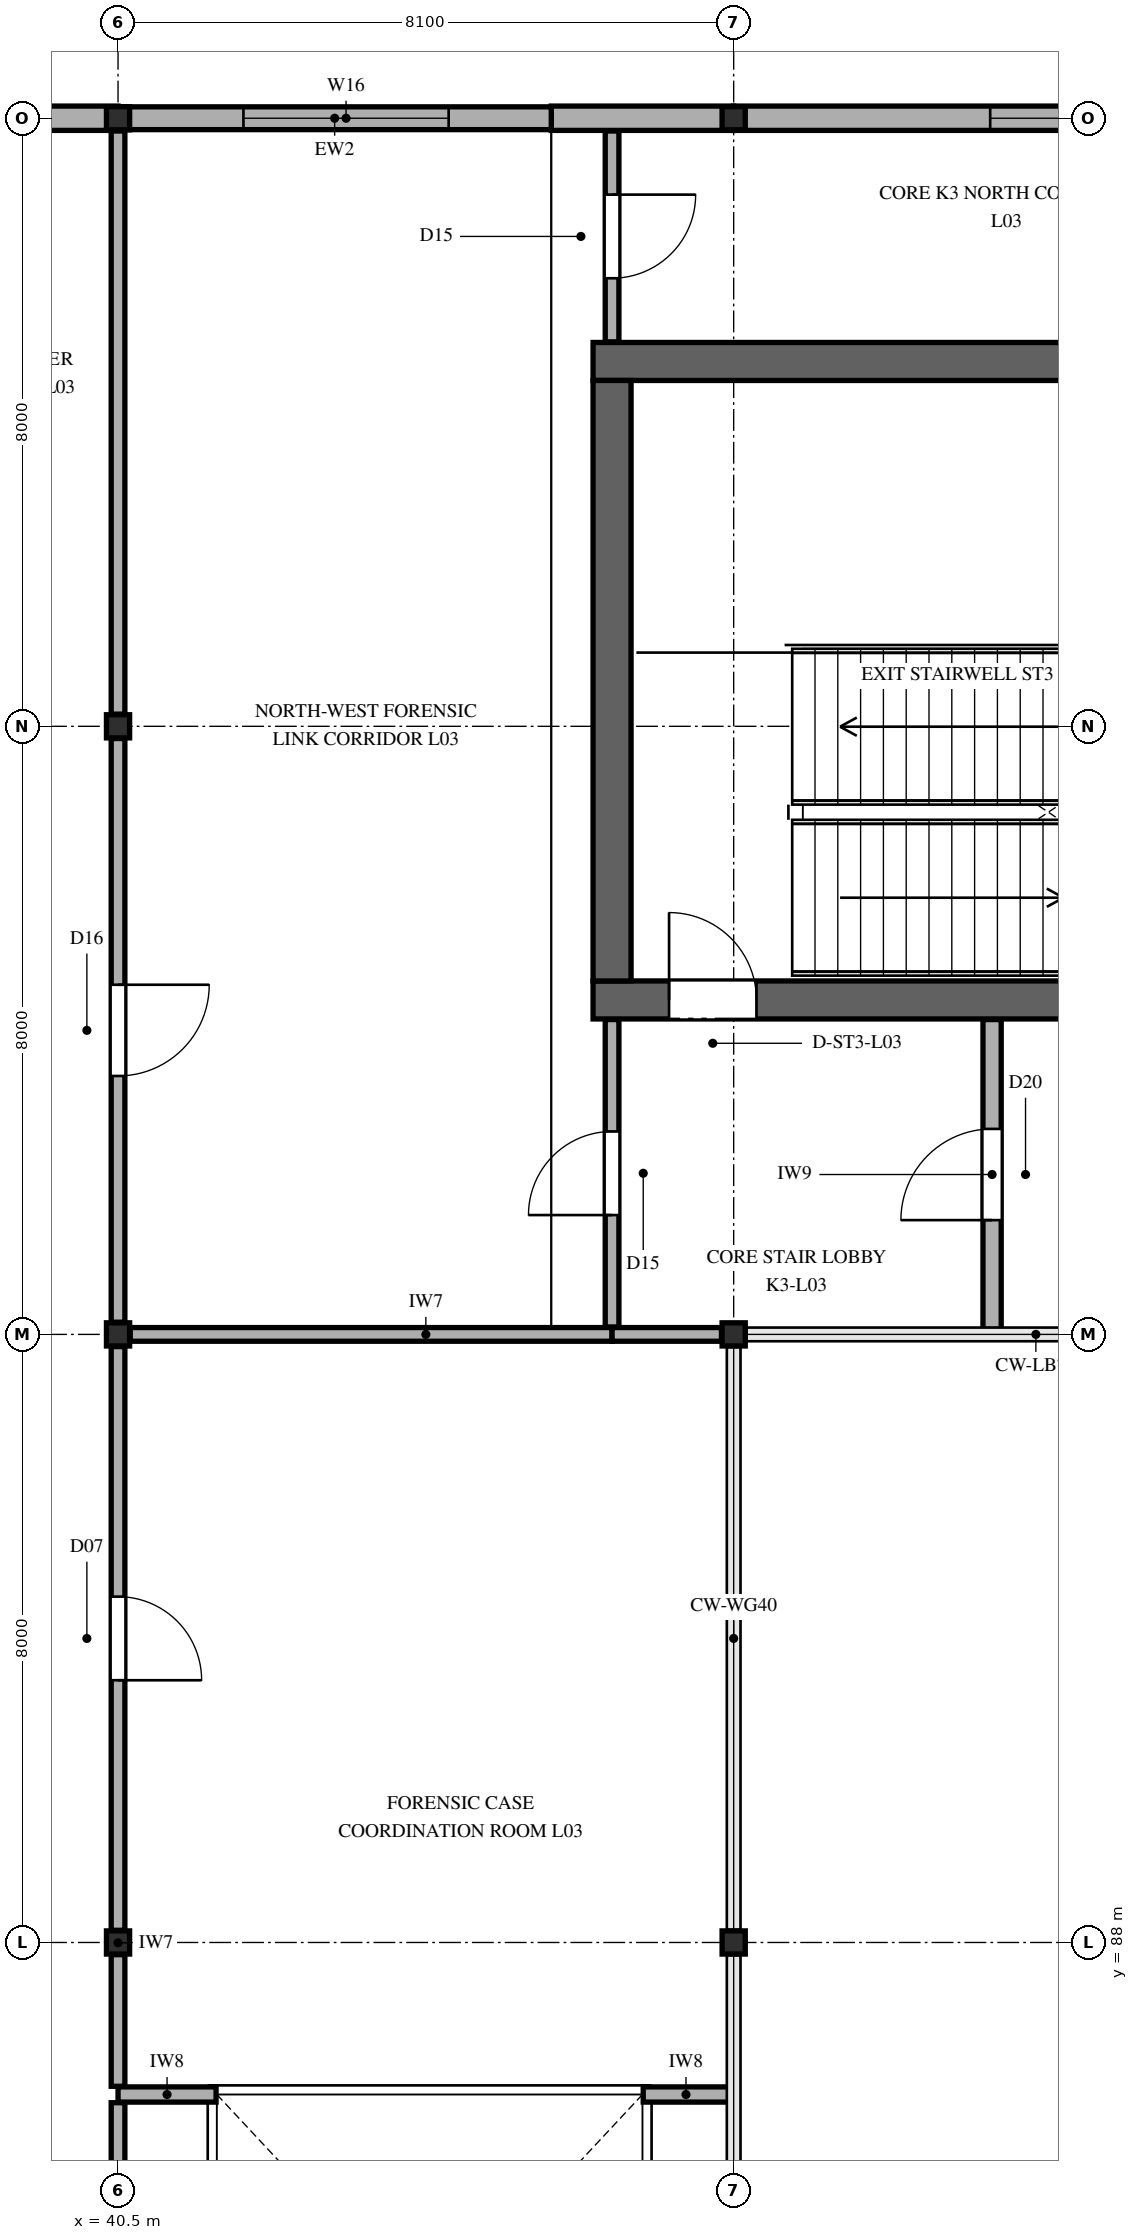
"""IFC4 building model, lengths in metres.
Left out: names, types, materials, properties, quantities, classifications, styles, units other than length and angle.
Written with IfcOpenShell. Run it as: python <this file> out.ifc"""

import sys

from ifc_helpers import new_model, si_unit, direction, frame, frame_2d, origin, origin_2d, place, context, subcontext, project, spatial, rectangle, hollow_rectangle, extrude, element, fill, save


model = new_model("IFC4")
c1 = context("Model", 3, precision=1e-05, world=origin(), true_north=direction((0.0, 1.0)))
c2 = subcontext(c1, "Body", "Model", "MODEL_VIEW")
j1 = project(units=[si_unit("LENGTHUNIT", "METRE"), si_unit("PLANEANGLEUNIT", "RADIAN")], contexts=[c1])
p1 = place(None, origin())
s1 = spatial("IfcSite", under=j1, at=p1, CompositionType="ELEMENT")
p2 = place(p1, origin())
s2 = spatial("IfcBuilding", under=s1, at=p2, CompositionType="ELEMENT")
p3 = place(p2, frame((0.0, 0.0, 14.7)))
s3 = spatial("IfcBuildingStorey", under=s2, at=p3, CompositionType="ELEMENT", Elevation=14.7)
p4 = place(p3, frame((46.75, 100.4, 0.0), z_axis=(0.0, 0.0, 1.0), x_axis=(1.0, 0.0, 0.0)))
e1 = element("IfcWall", 1, at=p4, inside=s3, PredefinedType="SHEAR", context=c2, shape_type="SweptSolid", body=[
    extrude(rectangle(XDim=15.3, YDim=0.5, at=frame_2d((7.65, 0.0))), origin(), (0.0, 0.0, 1.0), 5.1),
])
p5 = place(p4, frame((1.0, 0.0, 0.0)))
e2 = element("IfcOpeningElement", 2, at=p5, cuts=e1, PredefinedType="OPENING", context=c2, shape_type="SweptSolid", body=[
    extrude(rectangle(XDim=1.15, YDim=2.25, at=frame_2d((0.575, 1.125))), frame((0.0, 0.26, 0.0), z_axis=(0.0, -1.0, 0.0), x_axis=(1.0, 0.0, 0.0)), (0.0, 0.0, 1.0), 0.52),
])
p6 = place(p4, frame((10.282, 0.0, 0.0)))
e3 = element("IfcOpeningElement", 3, at=p6, cuts=e1, PredefinedType="OPENING", context=c2, shape_type="SweptSolid", body=[
    extrude(rectangle(XDim=1.1, YDim=2.2, at=frame_2d((0.55, 1.1))), frame((0.0, 0.26, 0.0), z_axis=(0.0, -1.0, 0.0), x_axis=(1.0, 0.0, 0.0)), (0.0, 0.0, 1.0), 0.52),
])
p7 = place(p4, frame((12.998, 0.0, 0.0)))
e4 = element("IfcOpeningElement", 4, at=p7, cuts=e1, PredefinedType="OPENING", context=c2, shape_type="SweptSolid", body=[
    extrude(rectangle(XDim=1.1, YDim=2.2, at=frame_2d((0.55, 1.1))), frame((0.0, 0.26, 0.0), z_axis=(0.0, -1.0, 0.0), x_axis=(1.0, 0.0, 0.0)), (0.0, 0.0, 1.0), 0.52),
])
p8 = place(p3, frame((46.75, 108.8, 0.0), z_axis=(0.0, 0.0, 1.0), x_axis=(1.0, 0.0, 0.0)))
e5 = element("IfcWall", 5, at=p8, inside=s3, PredefinedType="SHEAR", context=c2, shape_type="SweptSolid", body=[
    extrude(rectangle(XDim=15.3, YDim=0.5, at=frame_2d((7.65, 0.0))), origin(), (0.0, 0.0, 1.0), 5.1),
])
p9 = place(p3, frame((47.0, 100.65, 0.0), z_axis=(0.0, 0.0, 1.0), x_axis=(0.0, 1.0, 0.0)))
e6 = element("IfcWall", 6, at=p9, inside=s3, PredefinedType="SHEAR", context=c2, shape_type="SweptSolid", body=[
    extrude(rectangle(XDim=7.9, YDim=0.5, at=frame_2d((3.95, 0.0))), origin(), (0.0, 0.0, 1.0), 5.1),
])
for number, where, z_axis, x_axis in (
    (7, (40.5, 88.0, 0.0), (0.0, 0.0, 1.0), (1.0, 0.0, 0.0)),
    (8, (40.5, 96.0, 0.0), (0.0, 0.0, 1.0), (1.0, 0.0, 0.0)),
    (9, (40.5, 104.0, 0.0), (0.0, 0.0, 1.0), (1.0, 0.0, 0.0)),
    (10, (40.5, 112.0, 0.0), (0.0, 0.0, 1.0), (1.0, 0.0, 0.0)),
):
    element("IfcColumn", number, at=place(p3, frame(where, z_axis=z_axis, x_axis=x_axis)), inside=s3, PredefinedType="COLUMN", context=c2, shape_type="SweptSolid", body=[
        extrude(hollow_rectangle(XDim=0.305, YDim=0.305, WallThickness=0.016, InnerFilletRadius=0.016, OuterFilletRadius=0.032, at=origin_2d()), origin(), (0.0, 0.0, 1.0), 5.1),
    ])
p10 = place(p3, frame((48.6, 88.0, 0.0), z_axis=(0.0, 0.0, 1.0), x_axis=(1.0, 0.0, 0.0)))
e11 = element("IfcColumn", 11, at=p10, inside=s3, PredefinedType="COLUMN", context=c2, shape_type="SweptSolid", body=[
    extrude(hollow_rectangle(XDim=0.305, YDim=0.305, WallThickness=0.016, InnerFilletRadius=0.016, OuterFilletRadius=0.032, at=origin_2d()), origin(), (0.0, 0.0, 1.0), 4.84),
])
for number, where, z_axis, x_axis in (
    (12, (48.6, 96.0, 0.0), (0.0, 0.0, 1.0), (1.0, 0.0, 0.0)),
    (13, (48.6, 112.0, 0.0), (0.0, 0.0, 1.0), (1.0, 0.0, 0.0)),
):
    element("IfcColumn", number, at=place(p3, frame(where, z_axis=z_axis, x_axis=x_axis)), inside=s3, PredefinedType="COLUMN", context=c2, shape_type="SweptSolid", body=[
        extrude(hollow_rectangle(XDim=0.305, YDim=0.305, WallThickness=0.016, InnerFilletRadius=0.016, OuterFilletRadius=0.032, at=origin_2d()), origin(), (0.0, 0.0, 1.0), 5.1),
    ])
p11 = place(p3, frame((62.775, 112.0, 0.0), z_axis=(0.0, 0.0, 1.0), x_axis=(-1.0, 0.0, 0.0)))
e14 = element("IfcWall", 14, at=p11, inside=s3, PredefinedType="SOLIDWALL", context=c2, shape_type="SweptSolid", body=[
    extrude(rectangle(XDim=14.175, YDim=0.32, at=frame_2d((7.087, 0.0))), origin(), (0.0, 0.0, 1.0), 4.232),
])
p12 = place(p11, frame((8.1, 0.0, 0.95)))
e15 = element("IfcOpeningElement", 15, at=p12, cuts=e14, PredefinedType="OPENING", context=c2, shape_type="SweptSolid", body=[
    extrude(rectangle(XDim=2.7, YDim=1.8, at=frame_2d((1.35, 0.9))), frame((0.0, 0.17, 0.0), z_axis=(0.0, -1.0, 0.0), x_axis=(1.0, 0.0, 0.0)), (0.0, 0.0, 1.0), 0.34),
])
p13 = place(p3, frame((48.6, 112.0, 0.0), z_axis=(0.0, 0.0, 1.0), x_axis=(-1.0, 0.0, 0.0)))
e16 = element("IfcWall", 16, at=p13, inside=s3, PredefinedType="SOLIDWALL", context=c2, shape_type="SweptSolid", body=[
    extrude(rectangle(XDim=2.4, YDim=0.32, at=frame_2d((1.2, 0.0))), origin(), (0.0, 0.0, 1.0), 4.232),
])
p14 = place(p3, frame((46.2, 112.0, 0.0), z_axis=(0.0, 0.0, 1.0), x_axis=(-1.0, 0.0, 0.0)))
e17 = element("IfcWall", 17, at=p14, inside=s3, PredefinedType="SOLIDWALL", context=c2, shape_type="SweptSolid", body=[
    extrude(rectangle(XDim=5.7, YDim=0.3, at=frame_2d((2.85, 0.0))), origin(), (0.0, 0.0, 1.0), 4.232),
])
p15 = place(p14, frame((1.35, 0.0, 0.85)))
e18 = element("IfcOpeningElement", 18, at=p15, cuts=e17, PredefinedType="OPENING", context=c2, shape_type="SweptSolid", body=[
    extrude(rectangle(XDim=2.7, YDim=2.1, at=frame_2d((1.35, 1.05))), frame((0.0, 0.16, 0.0), z_axis=(0.0, -1.0, 0.0), x_axis=(1.0, 0.0, 0.0)), (0.0, 0.0, 1.0), 0.32),
])
p16 = place(p3, frame((40.5, 112.0, 0.0), z_axis=(0.0, 0.0, 1.0), x_axis=(-1.0, 0.0, 0.0)))
e19 = element("IfcWall", 19, at=p16, inside=s3, PredefinedType="SOLIDWALL", context=c2, shape_type="SweptSolid", body=[
    extrude(rectangle(XDim=12.15, YDim=0.32, at=frame_2d((6.075, 0.0))), origin(), (0.0, 0.0, 1.0), 4.232),
])
p17 = place(p3, frame((40.5, 86.0, 0.0), z_axis=(0.0, 0.0, 1.0), x_axis=(1.0, 0.0, 0.0)))
e20 = element("IfcWall", 20, at=p17, inside=s3, PredefinedType="PARTITIONING", context=c2, shape_type="SweptSolid", body=[
    extrude(rectangle(XDim=1.29, YDim=0.2, at=frame_2d((0.645, 0.0))), origin(), (0.0, 0.0, 1.0), 4.84),
])
p18 = place(p3, frame((47.41, 86.0, 0.0), z_axis=(0.0, 0.0, 1.0), x_axis=(1.0, 0.0, 0.0)))
e21 = element("IfcWall", 21, at=p18, inside=s3, PredefinedType="PARTITIONING", context=c2, shape_type="SweptSolid", body=[
    extrude(rectangle(XDim=1.125, YDim=0.2, at=frame_2d((0.562, 0.0))), origin(), (0.0, 0.0, 1.0), 4.84),
])
p19 = place(p3, frame((40.66, 96.0, 0.0), z_axis=(0.0, 0.0, 1.0), x_axis=(1.0, 0.0, 0.0)))
e22 = element("IfcWall", 22, at=p19, inside=s3, PredefinedType="PARTITIONING", context=c2, shape_type="SweptSolid", body=[
    extrude(rectangle(XDim=6.34, YDim=0.18, at=frame_2d((3.17, 0.0))), origin(), (0.0, 0.0, 1.0), 4.299),
])
p20 = place(p3, frame((47.0, 96.0, 0.0), z_axis=(0.0, 0.0, 1.0), x_axis=(1.0, 0.0, 0.0)))
e23 = element("IfcWall", 23, at=p20, inside=s3, PredefinedType="PARTITIONING", context=c2, shape_type="SweptSolid", body=[
    extrude(rectangle(XDim=1.44, YDim=0.18, at=frame_2d((0.72, 0.0))), origin(), (0.0, 0.0, 1.0), 4.299),
])
p21 = place(p3, frame((40.5, 80.16, 0.0), z_axis=(0.0, 0.0, 1.0), x_axis=(0.0, 1.0, 0.0)))
e24 = element("IfcWall", 24, at=p21, inside=s3, PredefinedType="PARTITIONING", context=c2, shape_type="SweptSolid", body=[
    extrude(rectangle(XDim=5.732, YDim=0.18, at=frame_2d((2.866, 0.0))), origin(), (0.0, 0.0, 1.0), 4.369),
])
p22 = place(p3, frame((40.5, 86.108, 0.0), z_axis=(0.0, 0.0, 1.0), x_axis=(0.0, 1.0, 0.0)))
e25 = element("IfcWall", 25, at=p22, inside=s3, PredefinedType="PARTITIONING", context=c2, shape_type="SweptSolid", body=[
    extrude(rectangle(XDim=1.732, YDim=0.18, at=frame_2d((0.866, 0.0))), origin(), (0.0, 0.0, 1.0), 4.369),
])
p23 = place(p3, frame((40.5, 88.16, 0.0), z_axis=(0.0, 0.0, 1.0), x_axis=(0.0, 1.0, 0.0)))
e26 = element("IfcWall", 26, at=p23, inside=s3, PredefinedType="PARTITIONING", context=c2, shape_type="SweptSolid", body=[
    extrude(rectangle(XDim=7.679, YDim=0.18, at=frame_2d((3.84, 0.0))), origin(), (0.0, 0.0, 1.0), 4.369),
])
p24 = place(p23, frame((3.29, 0.0, 0.0)))
e27 = element("IfcOpeningElement", 27, at=p24, cuts=e26, PredefinedType="OPENING", context=c2, shape_type="SweptSolid", body=[
    extrude(rectangle(XDim=1.1, YDim=2.2, at=frame_2d((0.55, 1.1))), frame((0.0, 0.1, 0.0), z_axis=(0.0, -1.0, 0.0), x_axis=(1.0, 0.0, 0.0)), (0.0, 0.0, 1.0), 0.2),
])
p25 = place(p3, frame((40.5, 96.16, 0.0), z_axis=(0.0, 0.0, 1.0), x_axis=(0.0, 1.0, 0.0)))
e28 = element("IfcWall", 28, at=p25, inside=s3, PredefinedType="PARTITIONING", context=c2, shape_type="SweptSolid", body=[
    extrude(rectangle(XDim=7.679, YDim=0.18, at=frame_2d((3.84, 0.0))), origin(), (0.0, 0.0, 1.0), 4.332),
])
p26 = place(p25, frame((3.24, 0.0, 0.0)))
e29 = element("IfcOpeningElement", 29, at=p26, cuts=e28, PredefinedType="OPENING", context=c2, shape_type="SweptSolid", body=[
    extrude(rectangle(XDim=1.2, YDim=2.2, at=frame_2d((0.6, 1.1))), frame((0.0, 0.1, 0.0), z_axis=(0.0, -1.0, 0.0), x_axis=(1.0, 0.0, 0.0)), (0.0, 0.0, 1.0), 0.2),
])
p27 = place(p3, frame((40.5, 104.16, 0.0), z_axis=(0.0, 0.0, 1.0), x_axis=(0.0, 1.0, 0.0)))
e30 = element("IfcWall", 30, at=p27, inside=s3, PredefinedType="PARTITIONING", context=c2, shape_type="SweptSolid", body=[
    extrude(rectangle(XDim=7.672, YDim=0.18, at=frame_2d((3.836, 0.0))), origin(), (0.0, 0.0, 1.0), 4.369),
])
p28 = place(p3, frame((47.0, 96.098, 0.0), z_axis=(0.0, 0.0, 1.0), x_axis=(0.0, 1.0, 0.0)))
e31 = element("IfcWall", 31, at=p28, inside=s3, PredefinedType="PARTITIONING", context=c2, shape_type="SweptSolid", body=[
    extrude(rectangle(XDim=4.044, YDim=0.18, at=frame_2d((2.022, 0.0))), origin(), (0.0, 0.0, 1.0), 4.84),
])
p29 = place(p28, frame((1.472, 0.0, 0.0)))
e32 = element("IfcOpeningElement", 32, at=p29, cuts=e31, PredefinedType="OPENING", context=c2, shape_type="SweptSolid", body=[
    extrude(rectangle(XDim=1.1, YDim=2.2, at=frame_2d((0.55, 1.1))), frame((0.0, 0.1, 0.0), z_axis=(0.0, -1.0, 0.0), x_axis=(1.0, 0.0, 0.0)), (0.0, 0.0, 1.0), 0.2),
])
p30 = place(p3, frame((47.0, 109.058, 0.0), z_axis=(0.0, 0.0, 1.0), x_axis=(0.0, 1.0, 0.0)))
e33 = element("IfcWall", 33, at=p30, inside=s3, PredefinedType="PARTITIONING", context=c2, shape_type="SweptSolid", body=[
    extrude(rectangle(XDim=2.774, YDim=0.18, at=frame_2d((1.387, 0.0))), origin(), (0.0, 0.0, 1.0), 4.84),
])
p31 = place(p30, frame((0.837, 0.0, 0.0)))
e34 = element("IfcOpeningElement", 34, at=p31, cuts=e33, PredefinedType="OPENING", context=c2, shape_type="SweptSolid", body=[
    extrude(rectangle(XDim=1.1, YDim=2.2, at=frame_2d((0.55, 1.1))), frame((0.0, 0.1, 0.0), z_axis=(0.0, -1.0, 0.0), x_axis=(1.0, 0.0, 0.0)), (0.0, 0.0, 1.0), 0.2),
])
p32 = place(p3, frame((52.0, 96.065, 0.0), z_axis=(0.0, 0.0, 1.0), x_axis=(0.0, 1.0, 0.0)))
e35 = element("IfcWall", 35, at=p32, inside=s3, PredefinedType="PARTITIONING", context=c2, shape_type="SweptSolid", body=[
    extrude(rectangle(XDim=4.077, YDim=0.24, at=frame_2d((2.039, 0.0))), origin(), (0.0, 0.0, 1.0), 4.84),
])
p33 = place(p32, frame((1.438, 0.0, 0.0)))
e36 = element("IfcOpeningElement", 36, at=p33, cuts=e35, PredefinedType="OPENING", context=c2, shape_type="SweptSolid", body=[
    extrude(rectangle(XDim=1.2, YDim=2.3, at=frame_2d((0.6, 1.15))), frame((0.0, 0.13, 0.0), z_axis=(0.0, -1.0, 0.0), x_axis=(1.0, 0.0, 0.0)), (0.0, 0.0, 1.0), 0.26),
])
p34 = place(p12, origin())
e37 = element("IfcWindow", 37, at=p34, inside=s3, PartitioningType="TRIPLE_PANEL_VERTICAL", PredefinedType="WINDOW", context=c2, shape_type="SweptSolid", body=[
    extrude(rectangle(XDim=2.7, YDim=1.8, at=frame_2d((1.35, 0.9))), frame((0.0, 0.03, 0.0), z_axis=(0.0, -1.0, 0.0), x_axis=(1.0, 0.0, 0.0)), (0.0, 0.0, 1.0), 0.06),
])
fill(e15, e37)
p35 = place(p15, origin())
e38 = element("IfcWindow", 38, at=p35, inside=s3, PartitioningType="TRIPLE_PANEL_VERTICAL", PredefinedType="WINDOW", context=c2, shape_type="SweptSolid", body=[
    extrude(rectangle(XDim=2.7, YDim=2.1, at=frame_2d((1.35, 1.05))), frame((0.0, 0.03, 0.0), z_axis=(0.0, -1.0, 0.0), x_axis=(1.0, 0.0, 0.0)), (0.0, 0.0, 1.0), 0.06),
])
fill(e18, e38)
p36 = place(p5, origin())
e39 = element("IfcDoor", 39, at=p36, inside=s3, OperationType="SINGLE_SWING_LEFT", PredefinedType="DOOR", context=c2, shape_type="SweptSolid", body=[
    extrude(rectangle(XDim=1.15, YDim=2.25, at=frame_2d((0.575, 1.125))), frame((0.0, 0.025, 0.0), z_axis=(0.0, -1.0, 0.0), x_axis=(1.0, 0.0, 0.0)), (0.0, 0.0, 1.0), 0.05),
])
fill(e2, e39)
p37 = place(p24, frame((1.1, 0.0, 0.0), z_axis=(0.0, 0.0, 1.0), x_axis=(-1.0, 0.0, 0.0)))
e40 = element("IfcDoor", 40, at=p37, inside=s3, OperationType="SINGLE_SWING_LEFT", PredefinedType="DOOR", context=c2, shape_type="SweptSolid", body=[
    extrude(rectangle(XDim=1.1, YDim=2.2, at=frame_2d((0.55, 1.1))), frame((0.0, 0.025, 0.0), z_axis=(0.0, -1.0, 0.0), x_axis=(1.0, 0.0, 0.0)), (0.0, 0.0, 1.0), 0.05),
])
fill(e27, e40)
p38 = place(p26, frame((1.2, 0.0, 0.0), z_axis=(0.0, 0.0, 1.0), x_axis=(-1.0, 0.0, 0.0)))
e41 = element("IfcDoor", 41, at=p38, inside=s3, OperationType="SINGLE_SWING_RIGHT", PredefinedType="DOOR", context=c2, shape_type="SweptSolid", body=[
    extrude(rectangle(XDim=1.2, YDim=2.2, at=frame_2d((0.6, 1.1))), frame((0.0, 0.025, 0.0), z_axis=(0.0, -1.0, 0.0), x_axis=(1.0, 0.0, 0.0)), (0.0, 0.0, 1.0), 0.05),
])
fill(e29, e41)
p39 = place(p29, origin())
e42 = element("IfcDoor", 42, at=p39, inside=s3, OperationType="SINGLE_SWING_LEFT", PredefinedType="DOOR", context=c2, shape_type="SweptSolid", body=[
    extrude(rectangle(XDim=1.1, YDim=2.2, at=frame_2d((0.55, 1.1))), frame((0.0, 0.025, 0.0), z_axis=(0.0, -1.0, 0.0), x_axis=(1.0, 0.0, 0.0)), (0.0, 0.0, 1.0), 0.05),
])
fill(e32, e42)
p40 = place(p31, frame((1.1, 0.0, 0.0), z_axis=(0.0, 0.0, 1.0), x_axis=(-1.0, 0.0, 0.0)))
e43 = element("IfcDoor", 43, at=p40, inside=s3, OperationType="SINGLE_SWING_RIGHT", PredefinedType="DOOR", context=c2, shape_type="SweptSolid", body=[
    extrude(rectangle(XDim=1.1, YDim=2.2, at=frame_2d((0.55, 1.1))), frame((0.0, 0.025, 0.0), z_axis=(0.0, -1.0, 0.0), x_axis=(1.0, 0.0, 0.0)), (0.0, 0.0, 1.0), 0.05),
])
fill(e34, e43)
p41 = place(p33, origin())
e44 = element("IfcDoor", 44, at=p41, inside=s3, OperationType="SINGLE_SWING_LEFT", PredefinedType="DOOR", context=c2, shape_type="SweptSolid", body=[
    extrude(rectangle(XDim=1.2, YDim=2.3, at=frame_2d((0.6, 1.15))), frame((0.0, 0.025, 0.0), z_axis=(0.0, -1.0, 0.0), x_axis=(1.0, 0.0, 0.0)), (0.0, 0.0, 1.0), 0.05),
])
fill(e36, e44)
save(model, sys.argv[1])
